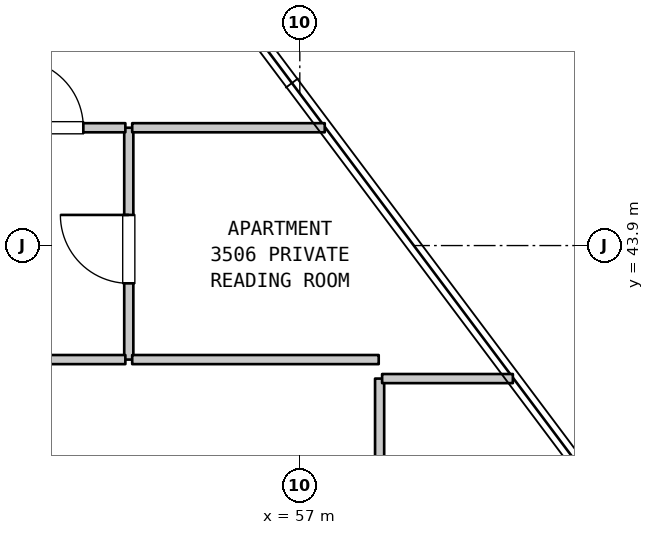
"""IFC4 building model, lengths in metres.
Left out: names, types, materials, properties, quantities, classifications, styles, units other than length and angle.
Written with IfcOpenShell. Run it as: python <this file> out.ifc"""

import sys

from ifc_helpers import new_model, si_unit, direction, frame, frame_2d, origin, place, context, subcontext, project, spatial, rectangle, extrude, element, fill, save


model = new_model("IFC4")
c1 = context("Model", 3, precision=1e-05, world=origin(), true_north=direction((0.0, 1.0)))
c2 = subcontext(c1, "Body", "Model", "MODEL_VIEW")
j1 = project(units=[si_unit("LENGTHUNIT", "METRE"), si_unit("PLANEANGLEUNIT", "RADIAN")], contexts=[c1])
p1 = place(None, origin())
s1 = spatial("IfcSite", under=j1, at=p1, CompositionType="ELEMENT")
p2 = place(p1, origin())
s2 = spatial("IfcBuilding", under=s1, at=p2, CompositionType="ELEMENT")
p3 = place(p2, frame((0.0, 0.0, 144.6)))
s3 = spatial("IfcBuildingStorey", under=s2, at=p3, CompositionType="ELEMENT", Elevation=144.6)
p4 = place(p3, frame((54.75, 42.4, 0.0), z_axis=(0.0, 0.0, 1.0), x_axis=(0.0, 1.0, 0.0)))
e1 = element("IfcWall", 1, at=p4, inside=s3, PredefinedType="PARTITIONING", context=c2, shape_type="SweptSolid", body=[
    extrude(rectangle(XDim=3.05, YDim=0.12, at=frame_2d((1.525, 0.0))), origin(), (0.0, 0.0, 1.0), 3.385),
])
p5 = place(p4, frame((1.003, 0.0, 0.0)))
e2 = element("IfcOpeningElement", 2, at=p5, cuts=e1, PredefinedType="OPENING", context=c2, shape_type="SweptSolid", body=[
    extrude(rectangle(XDim=0.9, YDim=2.15, at=frame_2d((0.45, 1.075))), frame((0.0, 0.07, 0.0), z_axis=(0.0, -1.0, 0.0), x_axis=(1.0, 0.0, 0.0)), (0.0, 0.0, 1.0), 0.14),
])
p6 = place(p3, frame((58.05, 40.1, 0.0), z_axis=(0.0, 0.0, 1.0), x_axis=(0.0, 1.0, 0.0)))
e3 = element("IfcWall", 3, at=p6, inside=s3, PredefinedType="PARTITIONING", context=c2, shape_type="SweptSolid", body=[
    extrude(rectangle(XDim=2.05, YDim=0.12, at=frame_2d((1.025, 0.0))), origin(), (0.0, 0.0, 1.0), 3.385),
])
p7 = place(p3, frame((58.083, 42.15, 0.0), z_axis=(0.0, 0.0, 1.0), x_axis=(1.0, 0.0, 0.0)))
e4 = element("IfcWall", 4, at=p7, inside=s3, PredefinedType="PARTITIONING", context=c2, shape_type="SweptSolid", body=[
    extrude(rectangle(XDim=1.72, YDim=0.12, at=frame_2d((0.86, 0.0))), origin(), (0.0, 0.0, 1.0), 3.385),
])
p8 = place(p3, frame((43.225, 42.4, 0.0), z_axis=(0.0, 0.0, 1.0), x_axis=(1.0, 0.0, 0.0)))
e5 = element("IfcWall", 5, at=p8, inside=s3, PredefinedType="PARTITIONING", context=c2, shape_type="SweptSolid", body=[
    extrude(rectangle(XDim=11.48, YDim=0.12, at=frame_2d((5.74, 0.0))), origin(), (0.0, 0.0, 1.0), 3.385),
])
p9 = place(p8, frame((5.29, 0.0, 0.0)))
e6 = element("IfcOpeningElement", 6, at=p9, cuts=e5, PredefinedType="OPENING", context=c2, shape_type="SweptSolid", body=[
    extrude(rectangle(XDim=0.9, YDim=2.15, at=frame_2d((0.45, 1.075))), frame((0.0, 0.07, 0.0), z_axis=(0.0, -1.0, 0.0), x_axis=(1.0, 0.0, 0.0)), (0.0, 0.0, 1.0), 0.14),
])
p10 = place(p3, frame((54.795, 42.4, 0.0), z_axis=(0.0, 0.0, 1.0), x_axis=(1.0, 0.0, 0.0)))
e7 = element("IfcWall", 7, at=p10, inside=s3, PredefinedType="PARTITIONING", context=c2, shape_type="SweptSolid", body=[
    extrude(rectangle(XDim=3.243, YDim=0.12, at=frame_2d((1.622, 0.0))), origin(), (0.0, 0.0, 1.0), 3.385),
])
p11 = place(p3, frame((32.725, 45.45, 0.0), z_axis=(0.0, 0.0, 1.0), x_axis=(1.0, 0.0, 0.0)))
e8 = element("IfcWall", 8, at=p11, inside=s3, PredefinedType="PARTITIONING", context=c2, shape_type="SweptSolid", body=[
    extrude(rectangle(XDim=21.98, YDim=0.12, at=frame_2d((10.99, 0.0))), origin(), (0.0, 0.0, 1.0), 3.385),
])
p12 = place(p11, frame((0.872, 0.0, 0.0)))
e9 = element("IfcOpeningElement", 9, at=p12, cuts=e8, PredefinedType="OPENING", context=c2, shape_type="SweptSolid", body=[
    extrude(rectangle(XDim=0.9, YDim=2.15, at=frame_2d((0.45, 1.075))), frame((0.0, 0.07, 0.0), z_axis=(0.0, -1.0, 0.0), x_axis=(1.0, 0.0, 0.0)), (0.0, 0.0, 1.0), 0.14),
])
p13 = place(p11, frame((3.309, 0.0, 0.0)))
e10 = element("IfcOpeningElement", 10, at=p13, cuts=e8, PredefinedType="OPENING", context=c2, shape_type="SweptSolid", body=[
    extrude(rectangle(XDim=0.9, YDim=2.15, at=frame_2d((0.45, 1.075))), frame((0.0, 0.07, 0.0), z_axis=(0.0, -1.0, 0.0), x_axis=(1.0, 0.0, 0.0)), (0.0, 0.0, 1.0), 0.14),
])
p14 = place(p11, frame((5.845, 0.0, 0.0)))
e11 = element("IfcOpeningElement", 11, at=p14, cuts=e8, PredefinedType="OPENING", context=c2, shape_type="SweptSolid", body=[
    extrude(rectangle(XDim=0.9, YDim=2.15, at=frame_2d((0.45, 1.075))), frame((0.0, 0.07, 0.0), z_axis=(0.0, -1.0, 0.0), x_axis=(1.0, 0.0, 0.0)), (0.0, 0.0, 1.0), 0.14),
])
p15 = place(p11, frame((8.38, 0.0, 0.0)))
e12 = element("IfcOpeningElement", 12, at=p15, cuts=e8, PredefinedType="OPENING", context=c2, shape_type="SweptSolid", body=[
    extrude(rectangle(XDim=0.9, YDim=2.15, at=frame_2d((0.45, 1.075))), frame((0.0, 0.07, 0.0), z_axis=(0.0, -1.0, 0.0), x_axis=(1.0, 0.0, 0.0)), (0.0, 0.0, 1.0), 0.14),
])
p16 = place(p11, frame((10.916, 0.0, 0.0)))
e13 = element("IfcOpeningElement", 13, at=p16, cuts=e8, PredefinedType="OPENING", context=c2, shape_type="SweptSolid", body=[
    extrude(rectangle(XDim=0.9, YDim=2.15, at=frame_2d((0.45, 1.075))), frame((0.0, 0.07, 0.0), z_axis=(0.0, -1.0, 0.0), x_axis=(1.0, 0.0, 0.0)), (0.0, 0.0, 1.0), 0.14),
])
p17 = place(p11, frame((13.452, 0.0, 0.0)))
e14 = element("IfcOpeningElement", 14, at=p17, cuts=e8, PredefinedType="OPENING", context=c2, shape_type="SweptSolid", body=[
    extrude(rectangle(XDim=0.9, YDim=2.15, at=frame_2d((0.45, 1.075))), frame((0.0, 0.07, 0.0), z_axis=(0.0, -1.0, 0.0), x_axis=(1.0, 0.0, 0.0)), (0.0, 0.0, 1.0), 0.14),
])
p18 = place(p11, frame((15.988, 0.0, 0.0)))
e15 = element("IfcOpeningElement", 15, at=p18, cuts=e8, PredefinedType="OPENING", context=c2, shape_type="SweptSolid", body=[
    extrude(rectangle(XDim=0.9, YDim=2.15, at=frame_2d((0.45, 1.075))), frame((0.0, 0.07, 0.0), z_axis=(0.0, -1.0, 0.0), x_axis=(1.0, 0.0, 0.0)), (0.0, 0.0, 1.0), 0.14),
])
p19 = place(p11, frame((18.524, 0.0, 0.0)))
e16 = element("IfcOpeningElement", 16, at=p19, cuts=e8, PredefinedType="OPENING", context=c2, shape_type="SweptSolid", body=[
    extrude(rectangle(XDim=0.9, YDim=2.15, at=frame_2d((0.45, 1.075))), frame((0.0, 0.07, 0.0), z_axis=(0.0, -1.0, 0.0), x_axis=(1.0, 0.0, 0.0)), (0.0, 0.0, 1.0), 0.14),
])
p20 = place(p11, frame((20.527, 0.0, 0.0)))
e17 = element("IfcOpeningElement", 17, at=p20, cuts=e8, PredefinedType="OPENING", context=c2, shape_type="SweptSolid", body=[
    extrude(rectangle(XDim=0.9, YDim=2.15, at=frame_2d((0.45, 1.075))), frame((0.0, 0.07, 0.0), z_axis=(0.0, -1.0, 0.0), x_axis=(1.0, 0.0, 0.0)), (0.0, 0.0, 1.0), 0.14),
])
p21 = place(p3, frame((54.795, 45.45, 0.0), z_axis=(0.0, 0.0, 1.0), x_axis=(1.0, 0.0, 0.0)))
e18 = element("IfcWall", 18, at=p21, inside=s3, PredefinedType="PARTITIONING", context=c2, shape_type="SweptSolid", body=[
    extrude(rectangle(XDim=2.533, YDim=0.12, at=frame_2d((1.267, 0.0))), origin(), (0.0, 0.0, 1.0), 3.385),
])
p22 = place(p5, origin())
e19 = element("IfcDoor", 19, at=p22, inside=s3, OperationType="SINGLE_SWING_RIGHT", PredefinedType="DOOR", context=c2, shape_type="SweptSolid", body=[
    extrude(rectangle(XDim=0.9, YDim=2.15, at=frame_2d((0.45, 1.075))), frame((0.0, 0.025, 0.0), z_axis=(0.0, -1.0, 0.0), x_axis=(1.0, 0.0, 0.0)), (0.0, 0.0, 1.0), 0.05),
])
fill(e2, e19)
p23 = place(p20, origin())
e20 = element("IfcDoor", 20, at=p23, inside=s3, OperationType="SINGLE_SWING_LEFT", PredefinedType="DOOR", context=c2, shape_type="SweptSolid", body=[
    extrude(rectangle(XDim=0.9, YDim=2.15, at=frame_2d((0.45, 1.075))), frame((0.0, 0.025, 0.0), z_axis=(0.0, -1.0, 0.0), x_axis=(1.0, 0.0, 0.0)), (0.0, 0.0, 1.0), 0.05),
])
fill(e17, e20)
save(model, sys.argv[1])
